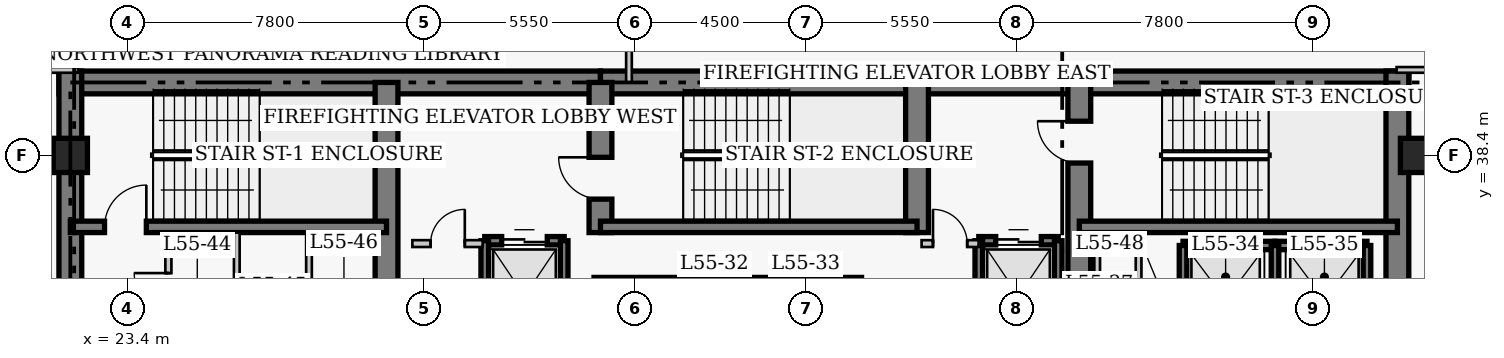
"""IFC4 building model, lengths in metres.
Left out: names, types, materials, properties, quantities, classifications, styles, units other than length and angle.
Written with IfcOpenShell. Run it as: python <this file> out.ifc"""

import sys

from ifc_helpers import new_model, si_unit, direction, frame, frame_2d, origin, origin_2d, place, context, subcontext, project, spatial, rectangle, extrude, element, fill, save


model = new_model("IFC4")
c1 = context("Model", 3, precision=1e-05, world=origin(), true_north=direction((0.0, 1.0)))
c2 = subcontext(c1, "Body", "Model", "MODEL_VIEW")
j1 = project(units=[si_unit("LENGTHUNIT", "METRE"), si_unit("PLANEANGLEUNIT", "RADIAN")], contexts=[c1])
p1 = place(None, origin())
s1 = spatial("IfcSite", under=j1, at=p1, CompositionType="ELEMENT")
p2 = place(p1, origin())
s2 = spatial("IfcBuilding", under=s1, at=p2, CompositionType="ELEMENT")
p3 = place(p2, frame((0.0, 0.0, 220.2)))
s3 = spatial("IfcBuildingStorey", under=s2, at=p3, CompositionType="ELEMENT", Elevation=220.2)
p4 = place(p3, frame((21.6, 40.32, 0.0), z_axis=(0.0, 0.0, 1.0), x_axis=(1.0, 0.0, 0.0)))
e1 = element("IfcWall", 1, at=p4, inside=s3, PredefinedType="SHEAR", context=c2, shape_type="SweptSolid", body=[
    extrude(rectangle(XDim=14.25, YDim=0.6, at=frame_2d((7.125, 0.0))), origin(), (0.0, 0.0, 1.0), 3.9),
])
p5 = place(p3, frame((35.85, 40.32, 0.0), z_axis=(0.0, 0.0, 1.0), x_axis=(1.0, 0.0, 0.0)))
e2 = element("IfcWall", 2, at=p5, inside=s3, PredefinedType="SHEAR", context=c2, shape_type="SweptSolid", body=[
    extrude(rectangle(XDim=12.6, YDim=0.6, at=frame_2d((6.3, 0.0))), origin(), (0.0, 0.0, 1.0), 3.9),
])
p6 = place(p3, frame((48.45, 40.32, 0.0), z_axis=(0.0, 0.0, 1.0), x_axis=(1.0, 0.0, 0.0)))
e3 = element("IfcWall", 3, at=p6, inside=s3, PredefinedType="SHEAR", context=c2, shape_type="SweptSolid", body=[
    extrude(rectangle(XDim=8.67, YDim=0.6, at=frame_2d((4.335, 0.0))), origin(), (0.0, 0.0, 1.0), 3.9),
])
for number, where, z_axis, x_axis in (
    (4, (21.9, 27.05, 0.0), (0.0, 0.0, 1.0), (0.0, 1.0, 0.0)),
    (5, (56.82, 27.05, 0.0), (0.0, 0.0, 1.0), (0.0, 1.0, 0.0)),
):
    element("IfcWall", number, at=place(p3, frame(where, z_axis=z_axis, x_axis=x_axis)), inside=s3, PredefinedType="SHEAR", context=c2, shape_type="SweptSolid", body=[
        extrude(rectangle(XDim=13.57, YDim=0.6, at=frame_2d((6.785, 0.0))), origin(), (0.0, 0.0, 1.0), 3.9),
    ])
p7 = place(p3, frame((30.22, 33.05, 0.0), z_axis=(0.0, 0.0, 1.0), x_axis=(0.0, 1.0, 0.0)))
e6 = element("IfcWall", 6, at=p7, inside=s3, PredefinedType="SHEAR", context=c2, shape_type="SweptSolid", body=[
    extrude(rectangle(XDim=7.27, YDim=0.6, at=frame_2d((3.635, 0.0))), origin(), (0.0, 0.0, 1.0), 3.9),
])
p8 = place(p3, frame((35.85, 36.37, 0.0), z_axis=(0.0, 0.0, 1.0), x_axis=(0.0, 1.0, 0.0)))
e7 = element("IfcWall", 7, at=p8, inside=s3, PredefinedType="SHEAR", context=c2, shape_type="SweptSolid", body=[
    extrude(rectangle(XDim=3.95, YDim=0.6, at=frame_2d((1.975, 0.0))), origin(), (0.0, 0.0, 1.0), 3.9),
])
p9 = place(p8, frame((0.88, 0.0, 0.0)))
e8 = element("IfcOpeningElement", 8, at=p9, cuts=e7, PredefinedType="OPENING", context=c2, shape_type="SweptSolid", body=[
    extrude(rectangle(XDim=1.1, YDim=2.15, at=frame_2d((0.55, 1.075))), frame((0.0, 0.31, 0.0), z_axis=(0.0, -1.0, 0.0), x_axis=(1.0, 0.0, 0.0)), (0.0, 0.0, 1.0), 0.62),
])
p10 = place(p3, frame((44.18, 36.37, 0.0), z_axis=(0.0, 0.0, 1.0), x_axis=(0.0, 1.0, 0.0)))
e9 = element("IfcWall", 9, at=p10, inside=s3, PredefinedType="SHEAR", context=c2, shape_type="SweptSolid", body=[
    extrude(rectangle(XDim=3.95, YDim=0.6, at=frame_2d((1.975, 0.0))), origin(), (0.0, 0.0, 1.0), 3.9),
])
p11 = place(p3, frame((48.45, 32.45, 0.0), z_axis=(0.0, 0.0, 1.0), x_axis=(0.0, 1.0, 0.0)))
e10 = element("IfcWall", 10, at=p11, inside=s3, PredefinedType="SHEAR", context=c2, shape_type="SweptSolid", body=[
    extrude(rectangle(XDim=7.87, YDim=0.6, at=frame_2d((3.935, 0.0))), origin(), (0.0, 0.0, 1.0), 3.9),
])
p12 = place(p11, frame((5.75, 0.0, 0.0)))
e11 = element("IfcOpeningElement", 11, at=p12, cuts=e10, PredefinedType="OPENING", context=c2, shape_type="SweptSolid", body=[
    extrude(rectangle(XDim=1.1, YDim=2.15, at=frame_2d((0.55, 1.075))), frame((0.0, 0.31, 0.0), z_axis=(0.0, -1.0, 0.0), x_axis=(1.0, 0.0, 0.0)), (0.0, 0.0, 1.0), 0.62),
])
p13 = place(p3, frame((21.9, 36.52, 0.0), z_axis=(0.0, 0.0, 1.0), x_axis=(1.0, 0.0, 0.0)))
e12 = element("IfcWall", 12, at=p13, inside=s3, PredefinedType="SHEAR", context=c2, shape_type="SweptSolid", body=[
    extrude(rectangle(XDim=8.32, YDim=0.3, at=frame_2d((4.16, 0.0))), origin(), (0.0, 0.0, 1.0), 3.9),
])
p14 = place(p13, frame((0.9, 0.0, 0.0)))
e13 = element("IfcOpeningElement", 13, at=p14, cuts=e12, PredefinedType="OPENING", context=c2, shape_type="SweptSolid", body=[
    extrude(rectangle(XDim=1.1, YDim=2.15, at=frame_2d((0.55, 1.075))), frame((0.0, 0.16, 0.0), z_axis=(0.0, -1.0, 0.0), x_axis=(1.0, 0.0, 0.0)), (0.0, 0.0, 1.0), 0.32),
])
p15 = place(p3, frame((35.85, 36.52, 0.0), z_axis=(0.0, 0.0, 1.0), x_axis=(1.0, 0.0, 0.0)))
e14 = element("IfcWall", 14, at=p15, inside=s3, PredefinedType="SHEAR", context=c2, shape_type="SweptSolid", body=[
    extrude(rectangle(XDim=8.33, YDim=0.3, at=frame_2d((4.165, 0.0))), origin(), (0.0, 0.0, 1.0), 3.9),
])
p16 = place(p3, frame((48.45, 36.52, 0.0), z_axis=(0.0, 0.0, 1.0), x_axis=(1.0, 0.0, 0.0)))
e15 = element("IfcWall", 15, at=p16, inside=s3, PredefinedType="SHEAR", context=c2, shape_type="SweptSolid", body=[
    extrude(rectangle(XDim=8.37, YDim=0.3, at=frame_2d((4.185, 0.0))), origin(), (0.0, 0.0, 1.0), 3.9),
])
for number, where, z_axis, x_axis in (
    (16, (21.9, 38.4, 0.0), (0.0, 0.0, 1.0), (1.0, 0.0, 0.0)),
    (17, (57.35, 38.4, 0.0), (0.0, 0.0, 1.0), (1.0, 0.0, 0.0)),
):
    element("IfcColumn", number, at=place(p3, frame(where, z_axis=z_axis, x_axis=x_axis)), inside=s3, PredefinedType="COLUMN", context=c2, shape_type="SweptSolid", body=[
        extrude(rectangle(XDim=0.9, YDim=0.9, at=origin_2d()), origin(), (0.0, 0.0, 1.0), 3.9),
    ])
p17 = place(p3, frame((35.68, 35.08, 0.0), z_axis=(0.0, 0.0, 1.0), x_axis=(1.0, 0.0, 0.0)))
e18 = element("IfcWall", 18, at=p17, inside=s3, PredefinedType="SHEAR", context=c2, shape_type="SweptSolid", body=[
    extrude(rectangle(XDim=2.32, YDim=0.22, at=frame_2d((1.16, 0.0))), origin(), (0.0, 0.0, 1.0), 3.9),
])
p18 = place(p3, frame((38.0, 35.08, 0.0), z_axis=(0.0, 0.0, 1.0), x_axis=(1.0, 0.0, 0.0)))
e19 = element("IfcWall", 19, at=p18, inside=s3, PredefinedType="SHEAR", context=c2, shape_type="SweptSolid", body=[
    extrude(rectangle(XDim=2.4, YDim=0.22, at=frame_2d((1.2, 0.0))), origin(), (0.0, 0.0, 1.0), 3.9),
])
p19 = place(p3, frame((40.4, 35.08, 0.0), z_axis=(0.0, 0.0, 1.0), x_axis=(1.0, 0.0, 0.0)))
e20 = element("IfcWall", 20, at=p19, inside=s3, PredefinedType="SHEAR", context=c2, shape_type="SweptSolid", body=[
    extrude(rectangle(XDim=2.32, YDim=0.22, at=frame_2d((1.16, 0.0))), origin(), (0.0, 0.0, 1.0), 3.9),
])
p20 = place(p3, frame((51.18, 36.03, 0.0), z_axis=(0.0, 0.0, 1.0), x_axis=(1.0, 0.0, 0.0)))
e21 = element("IfcWall", 21, at=p20, inside=s3, PredefinedType="SHEAR", context=c2, shape_type="SweptSolid", body=[
    extrude(rectangle(XDim=2.42, YDim=0.22, at=frame_2d((1.21, 0.0))), origin(), (0.0, 0.0, 1.0), 3.9),
])
p21 = place(p3, frame((51.18, 33.17, 0.0), z_axis=(0.0, 0.0, 1.0), x_axis=(0.0, 1.0, 0.0)))
e22 = element("IfcWall", 22, at=p21, inside=s3, PredefinedType="SHEAR", context=c2, shape_type="SweptSolid", body=[
    extrude(rectangle(XDim=2.86, YDim=0.2, at=frame_2d((1.43, 0.0))), origin(), (0.0, 0.0, 1.0), 3.9),
])
p22 = place(p3, frame((53.6, 36.03, 0.0), z_axis=(0.0, 0.0, 1.0), x_axis=(1.0, 0.0, 0.0)))
e23 = element("IfcWall", 23, at=p22, inside=s3, PredefinedType="SHEAR", context=c2, shape_type="SweptSolid", body=[
    extrude(rectangle(XDim=2.42, YDim=0.22, at=frame_2d((1.21, 0.0))), origin(), (0.0, 0.0, 1.0), 3.9),
])
for number, where, z_axis, x_axis in (
    (24, (53.6, 33.17, 0.0), (0.0, 0.0, 1.0), (0.0, 1.0, 0.0)),
    (25, (56.02, 33.17, 0.0), (0.0, 0.0, 1.0), (0.0, 1.0, 0.0)),
):
    element("IfcWall", number, at=place(p3, frame(where, z_axis=z_axis, x_axis=x_axis)), inside=s3, PredefinedType="SHEAR", context=c2, shape_type="SweptSolid", body=[
        extrude(rectangle(XDim=2.86, YDim=0.2, at=frame_2d((1.43, 0.0))), origin(), (0.0, 0.0, 1.0), 3.9),
    ])
p23 = place(p3, frame((32.805, 36.155, 0.0), z_axis=(0.0, 0.0, 1.0), x_axis=(1.0, 0.0, 0.0)))
e26 = element("IfcWall", 26, at=p23, inside=s3, PredefinedType="SHEAR", context=c2, shape_type="SweptSolid", body=[
    extrude(rectangle(XDim=2.09, YDim=0.22, at=frame_2d((1.045, 0.0))), origin(), (0.0, 0.0, 1.0), 3.9),
])
p24 = place(p23, frame((0.445, 0.0, 0.0)))
e27 = element("IfcOpeningElement", 27, at=p24, cuts=e26, PredefinedType="OPENING", context=c2, shape_type="SweptSolid", body=[
    extrude(rectangle(XDim=1.2, YDim=2.15, at=frame_2d((0.6, 1.075))), frame((0.0, 0.12, 0.0), z_axis=(0.0, -1.0, 0.0), x_axis=(1.0, 0.0, 0.0)), (0.0, 0.0, 1.0), 0.24),
])
for number, where, z_axis, x_axis in (
    (28, (32.805, 33.245, 0.0), (0.0, 0.0, 1.0), (0.0, 1.0, 0.0)),
    (29, (34.895, 33.245, 0.0), (0.0, 0.0, 1.0), (0.0, 1.0, 0.0)),
):
    element("IfcWall", number, at=place(p3, frame(where, z_axis=z_axis, x_axis=x_axis)), inside=s3, PredefinedType="SHEAR", context=c2, shape_type="SweptSolid", body=[
        extrude(rectangle(XDim=2.91, YDim=0.2, at=frame_2d((1.455, 0.0))), origin(), (0.0, 0.0, 1.0), 3.9),
    ])
p25 = place(p3, frame((45.805, 36.155, 0.0), z_axis=(0.0, 0.0, 1.0), x_axis=(1.0, 0.0, 0.0)))
e30 = element("IfcWall", 30, at=p25, inside=s3, PredefinedType="SHEAR", context=c2, shape_type="SweptSolid", body=[
    extrude(rectangle(XDim=2.09, YDim=0.22, at=frame_2d((1.045, 0.0))), origin(), (0.0, 0.0, 1.0), 3.9),
])
p26 = place(p25, frame((0.445, 0.0, 0.0)))
e31 = element("IfcOpeningElement", 31, at=p26, cuts=e30, PredefinedType="OPENING", context=c2, shape_type="SweptSolid", body=[
    extrude(rectangle(XDim=1.2, YDim=2.15, at=frame_2d((0.6, 1.075))), frame((0.0, 0.12, 0.0), z_axis=(0.0, -1.0, 0.0), x_axis=(1.0, 0.0, 0.0)), (0.0, 0.0, 1.0), 0.24),
])
p27 = place(p3, frame((45.805, 32.65, 0.0), z_axis=(0.0, 0.0, 1.0), x_axis=(0.0, 1.0, 0.0)))
e32 = element("IfcWall", 32, at=p27, inside=s3, PredefinedType="SHEAR", context=c2, shape_type="SweptSolid", body=[
    extrude(rectangle(XDim=3.505, YDim=0.2, at=frame_2d((1.752, 0.0))), origin(), (0.0, 0.0, 1.0), 3.9),
])
p28 = place(p3, frame((47.895, 33.245, 0.0), z_axis=(0.0, 0.0, 1.0), x_axis=(0.0, 1.0, 0.0)))
e33 = element("IfcWall", 33, at=p28, inside=s3, PredefinedType="SHEAR", context=c2, shape_type="SweptSolid", body=[
    extrude(rectangle(XDim=2.91, YDim=0.2, at=frame_2d((1.455, 0.0))), origin(), (0.0, 0.0, 1.0), 3.9),
])
p29 = place(p3, frame((30.9, 36.08, 0.0), z_axis=(0.0, 0.0, 1.0), x_axis=(1.0, 0.0, 0.0)))
e34 = element("IfcWall", 34, at=p29, inside=s3, PredefinedType="PARTITIONING", context=c2, shape_type="SweptSolid", body=[
    extrude(rectangle(XDim=1.85, YDim=0.18, at=frame_2d((0.925, 0.0))), origin(), (0.0, 0.0, 1.0), 3.65),
])
p30 = place(p29, frame((0.48, 0.0, 0.0)))
e35 = element("IfcOpeningElement", 35, at=p30, cuts=e34, PredefinedType="OPENING", context=c2, shape_type="SweptSolid", body=[
    extrude(rectangle(XDim=0.9, YDim=2.15, at=frame_2d((0.45, 1.075))), frame((0.0, 0.1, 0.0), z_axis=(0.0, -1.0, 0.0), x_axis=(1.0, 0.0, 0.0)), (0.0, 0.0, 1.0), 0.2),
])
p31 = place(p3, frame((44.3, 36.08, 0.0), z_axis=(0.0, 0.0, 1.0), x_axis=(1.0, 0.0, 0.0)))
e36 = element("IfcWall", 36, at=p31, inside=s3, PredefinedType="PARTITIONING", context=c2, shape_type="SweptSolid", body=[
    extrude(rectangle(XDim=1.5, YDim=0.18, at=frame_2d((0.75, 0.0))), origin(), (0.0, 0.0, 1.0), 3.65),
])
p32 = place(p31, frame((0.3, 0.0, 0.0)))
e37 = element("IfcOpeningElement", 37, at=p32, cuts=e36, PredefinedType="OPENING", context=c2, shape_type="SweptSolid", body=[
    extrude(rectangle(XDim=0.9, YDim=2.15, at=frame_2d((0.45, 1.075))), frame((0.0, 0.1, 0.0), z_axis=(0.0, -1.0, 0.0), x_axis=(1.0, 0.0, 0.0)), (0.0, 0.0, 1.0), 0.2),
])
p33 = place(p3, frame((24.48, 32.8, 0.0), z_axis=(0.0, 0.0, 1.0), x_axis=(0.0, 1.0, 0.0)))
e38 = element("IfcWall", 38, at=p33, inside=s3, PredefinedType="PARTITIONING", context=c2, shape_type="SweptSolid", body=[
    extrude(rectangle(XDim=3.57, YDim=0.16, at=frame_2d((1.785, 0.0))), origin(), (0.0, 0.0, 1.0), 3.65),
])
p34 = place(p33, frame((1.604, 0.0, 0.0)))
e39 = element("IfcOpeningElement", 39, at=p34, cuts=e38, PredefinedType="OPENING", context=c2, shape_type="SweptSolid", body=[
    extrude(rectangle(XDim=0.9, YDim=2.1, at=frame_2d((0.45, 1.05))), frame((0.0, 0.09, 0.0), z_axis=(0.0, -1.0, 0.0), x_axis=(1.0, 0.0, 0.0)), (0.0, 0.0, 1.0), 0.18),
])
for number, where, z_axis, x_axis in (
    (40, (48.92, 32.75, 0.0), (0.0, 0.0, 1.0), (0.0, 1.0, 0.0)),
    (41, (26.28, 32.75, 0.0), (0.0, 0.0, 1.0), (0.0, 1.0, 0.0)),
    (42, (28.18, 32.75, 0.0), (0.0, 0.0, 1.0), (0.0, 1.0, 0.0)),
    (43, (50.01, 32.75, 0.0), (0.0, 0.0, 1.0), (0.0, 1.0, 0.0)),
):
    element("IfcWall", number, at=place(p3, frame(where, z_axis=z_axis, x_axis=x_axis)), inside=s3, PredefinedType="PARTITIONING", context=c2, shape_type="SweptSolid", body=[
        extrude(rectangle(XDim=3.62, YDim=0.15, at=frame_2d((1.81, 0.0))), origin(), (0.0, 0.0, 1.0), 3.65),
    ])
p35 = place(p3, frame((16.64, 40.65, 0.0), z_axis=(0.0, 0.0, 1.0), x_axis=(1.0, 0.0, 0.0)))
e44 = element("IfcWall", 44, at=p35, inside=s3, PredefinedType="PARTITIONING", context=c2, shape_type="SweptSolid", body=[
    extrude(rectangle(XDim=5.46, YDim=0.15, at=frame_2d((2.73, 0.0))), origin(), (0.0, 0.0, 1.0), 3.65),
])
p36 = place(p35, frame((0.55, 0.0, 0.0)))
e45 = element("IfcOpeningElement", 45, at=p36, cuts=e44, PredefinedType="OPENING", context=c2, shape_type="SweptSolid", body=[
    extrude(rectangle(XDim=1.0, YDim=2.15, at=frame_2d((0.5, 1.075))), frame((0.0, 0.085, 0.0), z_axis=(0.0, -1.0, 0.0), x_axis=(1.0, 0.0, 0.0)), (0.0, 0.0, 1.0), 0.17),
])
p37 = place(p3, frame((56.8, 40.65, 0.0), z_axis=(0.0, 0.0, 1.0), x_axis=(1.0, 0.0, 0.0)))
e46 = element("IfcWall", 46, at=p37, inside=s3, PredefinedType="PARTITIONING", context=c2, shape_type="SweptSolid", body=[
    extrude(rectangle(XDim=4.01, YDim=0.15, at=frame_2d((2.005, 0.0))), origin(), (0.0, 0.0, 1.0), 3.65),
])
p38 = place(p37, frame((2.4, 0.0, 0.0)))
e47 = element("IfcOpeningElement", 47, at=p38, cuts=e46, PredefinedType="OPENING", context=c2, shape_type="SweptSolid", body=[
    extrude(rectangle(XDim=1.0, YDim=2.15, at=frame_2d((0.5, 1.075))), frame((0.0, 0.085, 0.0), z_axis=(0.0, -1.0, 0.0), x_axis=(1.0, 0.0, 0.0)), (0.0, 0.0, 1.0), 0.17),
])
p39 = place(p3, frame((36.6, 40.32, 0.0), z_axis=(0.0, 0.0, 1.0), x_axis=(0.0, 1.0, 0.0)))
e48 = element("IfcWall", 48, at=p39, inside=s3, PredefinedType="PARTITIONING", context=c2, shape_type="SweptSolid", body=[
    extrude(rectangle(XDim=2.345, YDim=0.15, at=frame_2d((1.172, 0.0))), origin(), (0.0, 0.0, 1.0), 3.65),
])
p40 = place(p24, origin())
e49 = element("IfcDoor", 49, at=p40, inside=s3, OperationType="DOUBLE_DOOR_SLIDING", PredefinedType="DOOR", context=c2, shape_type="SweptSolid", body=[
    extrude(rectangle(XDim=1.2, YDim=2.15, at=frame_2d((0.6, 1.075))), frame((0.0, 0.025, 0.0), z_axis=(0.0, -1.0, 0.0), x_axis=(1.0, 0.0, 0.0)), (0.0, 0.0, 1.0), 0.05),
])
fill(e27, e49)
p41 = place(p26, origin())
e50 = element("IfcDoor", 50, at=p41, inside=s3, OperationType="DOUBLE_DOOR_SLIDING", PredefinedType="DOOR", context=c2, shape_type="SweptSolid", body=[
    extrude(rectangle(XDim=1.2, YDim=2.15, at=frame_2d((0.6, 1.075))), frame((0.0, 0.025, 0.0), z_axis=(0.0, -1.0, 0.0), x_axis=(1.0, 0.0, 0.0)), (0.0, 0.0, 1.0), 0.05),
])
fill(e31, e50)
p42 = place(p30, origin())
e51 = element("IfcDoor", 51, at=p42, inside=s3, OperationType="SINGLE_SWING_RIGHT", PredefinedType="DOOR", context=c2, shape_type="SweptSolid", body=[
    extrude(rectangle(XDim=0.9, YDim=2.15, at=frame_2d((0.45, 1.075))), frame((0.0, 0.025, 0.0), z_axis=(0.0, -1.0, 0.0), x_axis=(1.0, 0.0, 0.0)), (0.0, 0.0, 1.0), 0.05),
])
fill(e35, e51)
p43 = place(p32, origin())
e52 = element("IfcDoor", 52, at=p43, inside=s3, OperationType="SINGLE_SWING_LEFT", PredefinedType="DOOR", context=c2, shape_type="SweptSolid", body=[
    extrude(rectangle(XDim=0.9, YDim=2.15, at=frame_2d((0.45, 1.075))), frame((0.0, 0.025, 0.0), z_axis=(0.0, -1.0, 0.0), x_axis=(1.0, 0.0, 0.0)), (0.0, 0.0, 1.0), 0.05),
])
fill(e37, e52)
p44 = place(p34, origin())
e53 = element("IfcDoor", 53, at=p44, inside=s3, OperationType="SINGLE_SWING_RIGHT", PredefinedType="DOOR", context=c2, shape_type="SweptSolid", body=[
    extrude(rectangle(XDim=0.9, YDim=2.1, at=frame_2d((0.45, 1.05))), frame((0.0, 0.025, 0.0), z_axis=(0.0, -1.0, 0.0), x_axis=(1.0, 0.0, 0.0)), (0.0, 0.0, 1.0), 0.05),
])
fill(e39, e53)
p45 = place(p14, origin())
e54 = element("IfcDoor", 54, at=p45, inside=s3, OperationType="SINGLE_SWING_RIGHT", PredefinedType="DOOR", context=c2, shape_type="SweptSolid", body=[
    extrude(rectangle(XDim=1.1, YDim=2.15, at=frame_2d((0.55, 1.075))), frame((0.0, 0.025, 0.0), z_axis=(0.0, -1.0, 0.0), x_axis=(1.0, 0.0, 0.0)), (0.0, 0.0, 1.0), 0.05),
])
fill(e13, e54)
p46 = place(p9, origin())
e55 = element("IfcDoor", 55, at=p46, inside=s3, OperationType="SINGLE_SWING_RIGHT", PredefinedType="DOOR", context=c2, shape_type="SweptSolid", body=[
    extrude(rectangle(XDim=1.1, YDim=2.15, at=frame_2d((0.55, 1.075))), frame((0.0, 0.025, 0.0), z_axis=(0.0, -1.0, 0.0), x_axis=(1.0, 0.0, 0.0)), (0.0, 0.0, 1.0), 0.05),
])
fill(e8, e55)
p47 = place(p12, origin())
e56 = element("IfcDoor", 56, at=p47, inside=s3, OperationType="SINGLE_SWING_RIGHT", PredefinedType="DOOR", context=c2, shape_type="SweptSolid", body=[
    extrude(rectangle(XDim=1.1, YDim=2.15, at=frame_2d((0.55, 1.075))), frame((0.0, 0.025, 0.0), z_axis=(0.0, -1.0, 0.0), x_axis=(1.0, 0.0, 0.0)), (0.0, 0.0, 1.0), 0.05),
])
fill(e11, e56)
save(model, sys.argv[1])
